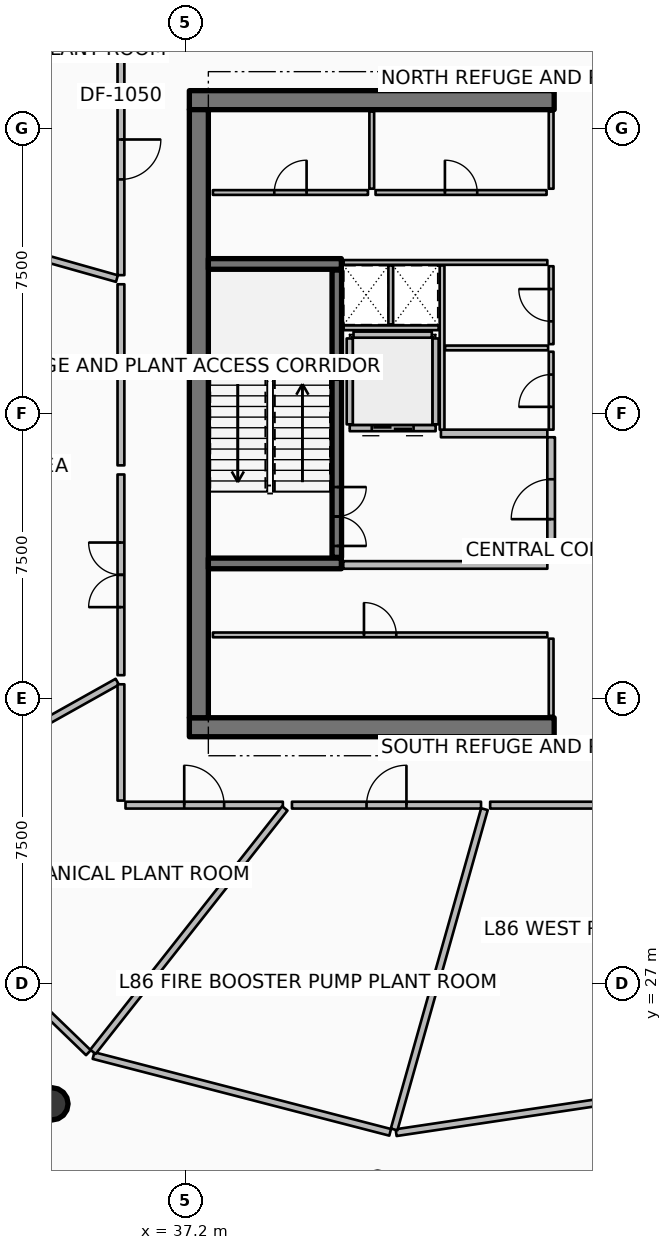
"""IFC4 building model, lengths in metres.
Left out: names, types, materials, properties, quantities, classifications, styles, units other than length and angle.
Written with IfcOpenShell. Run it as: python <this file> out.ifc"""

import sys

from ifc_helpers import new_model, si_unit, direction, frame, frame_2d, origin, origin_2d, place, context, subcontext, project, spatial, rectangle, hollow_rectangle, circle, extrude, element, fill, save


model = new_model("IFC4")
c1 = context("Model", 3, precision=1e-05, world=origin(), true_north=direction((0.0, 1.0)))
c2 = subcontext(c1, "Body", "Model", "MODEL_VIEW")
j1 = project(units=[si_unit("LENGTHUNIT", "METRE"), si_unit("PLANEANGLEUNIT", "RADIAN")], contexts=[c1])
p1 = place(None, origin())
s1 = spatial("IfcSite", under=j1, at=p1, CompositionType="ELEMENT")
p2 = place(p1, origin())
s2 = spatial("IfcBuilding", under=s1, at=p2, CompositionType="ELEMENT")
p3 = place(p2, frame((0.0, 0.0, 343.1)))
s3 = spatial("IfcBuildingStorey", under=s2, at=p3, CompositionType="ELEMENT", Elevation=343.1)
for number, where, z_axis, x_axis in (
    (1, (37.3, 33.75, 0.0), (0.0, 0.0, 1.0), (1.0, 0.0, 0.0)),
    (2, (37.3, 50.25, 0.0), (0.0, 0.0, 1.0), (1.0, 0.0, 0.0)),
):
    element("IfcWall", number, at=place(p3, frame(where, z_axis=z_axis, x_axis=x_axis)), inside=s3, PredefinedType="SHEAR", context=c2, shape_type="SweptSolid", body=[
        extrude(rectangle(XDim=9.6, YDim=0.5, at=frame_2d((4.8, 0.0))), origin(), (0.0, 0.0, 1.0), 4.2),
    ])
p4 = place(p3, frame((37.55, 34.0, 0.0), z_axis=(0.0, 0.0, 1.0), x_axis=(0.0, 1.0, 0.0)))
e3 = element("IfcWall", 3, at=p4, inside=s3, PredefinedType="SHEAR", context=c2, shape_type="SweptSolid", body=[
    extrude(rectangle(XDim=16.0, YDim=0.5, at=frame_2d((8.0, 0.0))), origin(), (0.0, 0.0, 1.0), 4.2),
])
for number, where, z_axis, x_axis in (
    (4, (37.8, 38.06, 0.0), (0.0, 0.0, 1.0), (1.0, 0.0, 0.0)),
    (5, (37.8, 45.94, 0.0), (0.0, 0.0, 1.0), (1.0, 0.0, 0.0)),
):
    element("IfcWall", number, at=place(p3, frame(where, z_axis=z_axis, x_axis=x_axis)), inside=s3, PredefinedType="SHEAR", context=c2, shape_type="SweptSolid", body=[
        extrude(rectangle(XDim=3.5, YDim=0.28, at=frame_2d((1.75, 0.0))), origin(), (0.0, 0.0, 1.0), 4.2),
    ])
p5 = place(p3, frame((41.18, 43.03, 0.0), z_axis=(0.0, 0.0, 1.0), x_axis=(1.0, 0.0, 0.0)))
e6 = element("IfcColumn", 6, at=p5, inside=s3, PredefinedType="COLUMN", context=c2, shape_type="SweptSolid", body=[
    extrude(hollow_rectangle(XDim=0.2, YDim=0.2, WallThickness=0.01, InnerFilletRadius=0.01, OuterFilletRadius=0.02, at=origin_2d()), origin(), (0.0, 0.0, 1.0), 1.895),
])
p6 = place(p3, frame((33.684, 23.841, 0.0), z_axis=(0.0, 0.0, 1.0), x_axis=(1.0, 0.0, 0.0)))
e7 = element("IfcColumn", 7, at=p6, inside=s3, PredefinedType="COLUMN", context=c2, shape_type="SweptSolid", body=[
    extrude(circle(Radius=0.425, at=origin_2d()), origin(), (0.0, 0.0, 1.0), 3.94),
])
p7 = place(p3, frame((41.18, 38.22, 0.0), z_axis=(0.0, 0.0, 1.0), x_axis=(0.0, 1.0, 0.0)))
e8 = element("IfcWall", 8, at=p7, inside=s3, PredefinedType="SOLIDWALL", context=c2, shape_type="SweptSolid", body=[
    extrude(rectangle(XDim=7.56, YDim=0.25, at=frame_2d((3.78, 0.0))), origin(), (0.0, 0.0, 1.0), 3.94),
])
p8 = place(p7, frame((0.3, 0.0, 0.0)))
e9 = element("IfcOpeningElement", 9, at=p8, cuts=e8, PredefinedType="OPENING", context=c2, shape_type="SweptSolid", body=[
    extrude(rectangle(XDim=1.55, YDim=2.15, at=frame_2d((0.775, 1.075))), frame((0.0, 0.135, 0.0), z_axis=(0.0, -1.0, 0.0), x_axis=(1.0, 0.0, 0.0)), (0.0, 0.0, 1.0), 0.27),
])
p9 = place(p3, frame((43.78, 41.62, 0.0), z_axis=(0.0, 0.0, 1.0), x_axis=(-1.0, 0.0, 0.0)))
e10 = element("IfcWall", 10, at=p9, inside=s3, PredefinedType="PARTITIONING", context=c2, shape_type="SweptSolid", body=[
    extrude(rectangle(XDim=2.26, YDim=0.16, at=frame_2d((1.13, 0.0))), origin(), (0.0, 0.0, 1.0), 3.94),
])
p10 = place(p9, frame((0.58, 0.0, 0.0)))
e11 = element("IfcOpeningElement", 11, at=p10, cuts=e10, PredefinedType="OPENING", context=c2, shape_type="SweptSolid", body=[
    extrude(rectangle(XDim=1.1, YDim=2.1, at=frame_2d((0.55, 1.05))), frame((0.0, 0.09, 0.0), z_axis=(0.0, -1.0, 0.0), x_axis=(1.0, 0.0, 0.0)), (0.0, 0.0, 1.0), 0.18),
])
for number, where, z_axis, x_axis in (
    (12, (43.78, 41.72, 0.0), (0.0, 0.0, 1.0), (0.0, 1.0, 0.0)),
    (13, (41.52, 41.72, 0.0), (0.0, 0.0, 1.0), (0.0, 1.0, 0.0)),
):
    element("IfcWall", number, at=place(p3, frame(where, z_axis=z_axis, x_axis=x_axis)), inside=s3, PredefinedType="PARTITIONING", context=c2, shape_type="SweptSolid", body=[
        extrude(rectangle(XDim=2.26, YDim=0.16, at=frame_2d((1.13, 0.0))), origin(), (0.0, 0.0, 1.0), 3.94),
    ])
p11 = place(p3, frame((41.62, 44.08, 0.0), z_axis=(0.0, 0.0, 1.0), x_axis=(1.0, 0.0, 0.0)))
e14 = element("IfcWall", 14, at=p11, inside=s3, PredefinedType="PARTITIONING", context=c2, shape_type="SweptSolid", body=[
    extrude(rectangle(XDim=2.06, YDim=0.16, at=frame_2d((1.03, 0.0))), origin(), (0.0, 0.0, 1.0), 3.94),
])
p12 = place(p3, frame((46.82, 34.05, 0.0), z_axis=(0.0, 0.0, 1.0), x_axis=(0.0, 1.0, 0.0)))
e15 = element("IfcWall", 15, at=p12, inside=s3, PredefinedType="PARTITIONING", context=c2, shape_type="SweptSolid", body=[
    extrude(rectangle(XDim=2.03, YDim=0.125, at=frame_2d((1.015, 0.0))), origin(), (0.0, 0.0, 1.0), 3.38),
])
p13 = place(p3, frame((37.92, 36.18, 0.0), z_axis=(0.0, 0.0, 1.0), x_axis=(1.0, 0.0, 0.0)))
e16 = element("IfcWall", 16, at=p13, inside=s3, PredefinedType="PARTITIONING", context=c2, shape_type="SweptSolid", body=[
    extrude(rectangle(XDim=8.8, YDim=0.125, at=frame_2d((4.4, 0.0))), origin(), (0.0, 0.0, 1.0), 3.38),
])
p14 = place(p13, frame((3.975, 0.0, 0.0)))
e17 = element("IfcOpeningElement", 17, at=p14, cuts=e16, PredefinedType="OPENING", context=c2, shape_type="SweptSolid", body=[
    extrude(rectangle(XDim=0.85, YDim=2.06, at=frame_2d((0.425, 1.03))), frame((0.0, 0.073, 0.0), z_axis=(0.0, -1.0, 0.0), x_axis=(1.0, 0.0, 0.0)), (0.0, 0.0, 1.0), 0.145),
])
for number, where, z_axis, x_axis in (
    (18, (46.82, 47.92, 0.0), (0.0, 0.0, 1.0), (0.0, 1.0, 0.0)),
    (19, (42.1, 47.92, 0.0), (0.0, 0.0, 1.0), (0.0, 1.0, 0.0)),
):
    element("IfcWall", number, at=place(p3, frame(where, z_axis=z_axis, x_axis=x_axis)), inside=s3, PredefinedType="PARTITIONING", context=c2, shape_type="SweptSolid", body=[
        extrude(rectangle(XDim=2.03, YDim=0.125, at=frame_2d((1.015, 0.0))), origin(), (0.0, 0.0, 1.0), 3.38),
    ])
p15 = place(p3, frame((37.92, 47.82, 0.0), z_axis=(0.0, 0.0, 1.0), x_axis=(1.0, 0.0, 0.0)))
e20 = element("IfcWall", 20, at=p15, inside=s3, PredefinedType="PARTITIONING", context=c2, shape_type="SweptSolid", body=[
    extrude(rectangle(XDim=4.08, YDim=0.125, at=frame_2d((2.04, 0.0))), origin(), (0.0, 0.0, 1.0), 3.38),
])
p16 = place(p15, frame((1.615, 0.0, 0.0)))
e21 = element("IfcOpeningElement", 21, at=p16, cuts=e20, PredefinedType="OPENING", context=c2, shape_type="SweptSolid", body=[
    extrude(rectangle(XDim=0.85, YDim=2.06, at=frame_2d((0.425, 1.03))), frame((0.0, 0.073, 0.0), z_axis=(0.0, -1.0, 0.0), x_axis=(1.0, 0.0, 0.0)), (0.0, 0.0, 1.0), 0.145),
])
p17 = place(p3, frame((42.2, 47.82, 0.0), z_axis=(0.0, 0.0, 1.0), x_axis=(1.0, 0.0, 0.0)))
e22 = element("IfcWall", 22, at=p17, inside=s3, PredefinedType="PARTITIONING", context=c2, shape_type="SweptSolid", body=[
    extrude(rectangle(XDim=4.5, YDim=0.125, at=frame_2d((2.25, 0.0))), origin(), (0.0, 0.0, 1.0), 3.38),
])
p18 = place(p17, frame((1.825, 0.0, 0.0)))
e23 = element("IfcOpeningElement", 23, at=p18, cuts=e22, PredefinedType="OPENING", context=c2, shape_type="SweptSolid", body=[
    extrude(rectangle(XDim=0.85, YDim=2.06, at=frame_2d((0.425, 1.03))), frame((0.0, 0.073, 0.0), z_axis=(0.0, -1.0, 0.0), x_axis=(1.0, 0.0, 0.0)), (0.0, 0.0, 1.0), 0.145),
])
p19 = place(p3, frame((41.35, 38.02, 0.0), z_axis=(0.0, 0.0, 1.0), x_axis=(1.0, 0.0, 0.0)))
e24 = element("IfcWall", 24, at=p19, inside=s3, PredefinedType="PARTITIONING", context=c2, shape_type="SweptSolid", body=[
    extrude(rectangle(XDim=5.37, YDim=0.2, at=frame_2d((2.685, 0.0))), origin(), (0.0, 0.0, 1.0), 3.94),
])
p20 = place(p3, frame((43.92, 41.48, 0.0), z_axis=(0.0, 0.0, 1.0), x_axis=(1.0, 0.0, 0.0)))
e25 = element("IfcWall", 25, at=p20, inside=s3, PredefinedType="PARTITIONING", context=c2, shape_type="SweptSolid", body=[
    extrude(rectangle(XDim=2.8, YDim=0.2, at=frame_2d((1.4, 0.0))), origin(), (0.0, 0.0, 1.0), 3.94),
])
p21 = place(p3, frame((46.82, 38.12, 0.0), z_axis=(0.0, 0.0, 1.0), x_axis=(0.0, 1.0, 0.0)))
e26 = element("IfcWall", 26, at=p21, inside=s3, PredefinedType="PARTITIONING", context=c2, shape_type="SweptSolid", body=[
    extrude(rectangle(XDim=3.26, YDim=0.2, at=frame_2d((1.63, 0.0))), origin(), (0.0, 0.0, 1.0), 3.94),
])
p22 = place(p21, frame((1.105, 0.0, 0.0)))
e27 = element("IfcOpeningElement", 27, at=p22, cuts=e26, PredefinedType="OPENING", context=c2, shape_type="SweptSolid", body=[
    extrude(rectangle(XDim=1.05, YDim=2.1, at=frame_2d((0.525, 1.05))), frame((0.0, 0.11, 0.0), z_axis=(0.0, -1.0, 0.0), x_axis=(1.0, 0.0, 0.0)), (0.0, 0.0, 1.0), 0.22),
])
p23 = place(p3, frame((41.36, 45.98, 0.0), z_axis=(0.0, 0.0, 1.0), x_axis=(1.0, 0.0, 0.0)))
e28 = element("IfcWall", 28, at=p23, inside=s3, PredefinedType="PARTITIONING", context=c2, shape_type="SweptSolid", body=[
    extrude(rectangle(XDim=5.36, YDim=0.125, at=frame_2d((2.68, 0.0))), origin(), (0.0, 0.0, 1.0), 3.38),
])
p24 = place(p3, frame((41.36, 44.26, 0.0), z_axis=(0.0, 0.0, 1.0), x_axis=(1.0, 0.0, 0.0)))
e29 = element("IfcWall", 29, at=p24, inside=s3, PredefinedType="PARTITIONING", context=c2, shape_type="SweptSolid", body=[
    extrude(rectangle(XDim=2.5, YDim=0.125, at=frame_2d((1.25, 0.0))), origin(), (0.0, 0.0, 1.0), 3.38),
])
p25 = place(p3, frame((42.6, 44.35, 0.0), z_axis=(0.0, 0.0, 1.0), x_axis=(0.0, 1.0, 0.0)))
e30 = element("IfcWall", 30, at=p25, inside=s3, PredefinedType="PARTITIONING", context=c2, shape_type="SweptSolid", body=[
    extrude(rectangle(XDim=1.55, YDim=0.125, at=frame_2d((0.775, 0.0))), origin(), (0.0, 0.0, 1.0), 3.38),
])
p26 = place(p3, frame((43.95, 41.58, 0.0), z_axis=(0.0, 0.0, 1.0), x_axis=(0.0, 1.0, 0.0)))
e31 = element("IfcWall", 31, at=p26, inside=s3, PredefinedType="PARTITIONING", context=c2, shape_type="SweptSolid", body=[
    extrude(rectangle(XDim=4.32, YDim=0.125, at=frame_2d((2.16, 0.0))), origin(), (0.0, 0.0, 1.0), 3.38),
])
p27 = place(p3, frame((44.03, 43.73, 0.0), z_axis=(0.0, 0.0, 1.0), x_axis=(1.0, 0.0, 0.0)))
e32 = element("IfcWall", 32, at=p27, inside=s3, PredefinedType="PARTITIONING", context=c2, shape_type="SweptSolid", body=[
    extrude(rectangle(XDim=2.71, YDim=0.125, at=frame_2d((1.355, 0.0))), origin(), (0.0, 0.0, 1.0), 3.38),
])
p28 = place(p3, frame((46.82, 41.58, 0.0), z_axis=(0.0, 0.0, 1.0), x_axis=(0.0, 1.0, 0.0)))
e33 = element("IfcWall", 33, at=p28, inside=s3, PredefinedType="PARTITIONING", context=c2, shape_type="SweptSolid", body=[
    extrude(rectangle(XDim=2.05, YDim=0.125, at=frame_2d((1.025, 0.0))), origin(), (0.0, 0.0, 1.0), 3.38),
])
p29 = place(p28, frame((0.6, 0.0, 0.0)))
e34 = element("IfcOpeningElement", 34, at=p29, cuts=e33, PredefinedType="OPENING", context=c2, shape_type="SweptSolid", body=[
    extrude(rectangle(XDim=0.85, YDim=2.06, at=frame_2d((0.425, 1.03))), frame((0.0, 0.073, 0.0), z_axis=(0.0, -1.0, 0.0), x_axis=(1.0, 0.0, 0.0)), (0.0, 0.0, 1.0), 0.145),
])
p30 = place(p3, frame((46.82, 43.83, 0.0), z_axis=(0.0, 0.0, 1.0), x_axis=(0.0, 1.0, 0.0)))
e35 = element("IfcWall", 35, at=p30, inside=s3, PredefinedType="PARTITIONING", context=c2, shape_type="SweptSolid", body=[
    extrude(rectangle(XDim=2.05, YDim=0.125, at=frame_2d((1.025, 0.0))), origin(), (0.0, 0.0, 1.0), 3.38),
])
p31 = place(p30, frame((0.6, 0.0, 0.0)))
e36 = element("IfcOpeningElement", 36, at=p31, cuts=e35, PredefinedType="OPENING", context=c2, shape_type="SweptSolid", body=[
    extrude(rectangle(XDim=0.85, YDim=2.06, at=frame_2d((0.425, 1.03))), frame((0.0, 0.073, 0.0), z_axis=(0.0, -1.0, 0.0), x_axis=(1.0, 0.0, 0.0)), (0.0, 0.0, 1.0), 0.145),
])
p32 = place(p3, frame((28.583, 31.038, 0.0), z_axis=(0.0, 0.0, 1.0), x_axis=(0.719358516059, -0.694638989241, 0.0)))
e37 = element("IfcWall", 37, at=p32, inside=s3, PredefinedType="PARTITIONING", context=c2, shape_type="SweptSolid", body=[
    extrude(rectangle(XDim=8.425, YDim=0.18, at=frame_2d((4.212, 0.0))), origin(), (0.0, 0.0, 1.0), 2.933),
])
p33 = place(p3, frame((34.779, 25.111, 0.0), z_axis=(0.0, 0.0, 1.0), x_axis=(0.96812020229, -0.250486075298, 0.0)))
e38 = element("IfcWall", 38, at=p33, inside=s3, PredefinedType="PARTITIONING", context=c2, shape_type="SweptSolid", body=[
    extrude(rectangle(XDim=8.062, YDim=0.18, at=frame_2d((4.031, 0.0))), origin(), (0.0, 0.0, 1.0), 2.933),
])
p34 = place(p3, frame((42.74, 23.083, 0.0), z_axis=(0.0, 0.0, 1.0), x_axis=(0.989035992024, 0.147674664315, 0.0)))
e39 = element("IfcWall", 39, at=p34, inside=s3, PredefinedType="PARTITIONING", context=c2, shape_type="SweptSolid", body=[
    extrude(rectangle(XDim=7.37, YDim=0.18, at=frame_2d((3.685, 0.0))), origin(), (0.0, 0.0, 1.0), 2.933),
])
p35 = place(p3, frame((35.5, 51.734, 0.0), z_axis=(0.0, 0.0, 1.0), x_axis=(0.0, -1.0, 0.0)))
e40 = element("IfcWall", 40, at=p35, inside=s3, PredefinedType="PARTITIONING", context=c2, shape_type="SweptSolid", body=[
    extrude(rectangle(XDim=6.089, YDim=0.18, at=frame_2d((3.044, 0.0))), origin(), (0.0, 0.0, 1.0), 2.933),
])
p36 = place(p35, frame((2.519, 0.0, 0.0)))
e41 = element("IfcOpeningElement", 41, at=p36, cuts=e40, PredefinedType="OPENING", context=c2, shape_type="SweptSolid", body=[
    extrude(rectangle(XDim=1.05, YDim=2.1, at=frame_2d((0.525, 1.05))), frame((0.0, 0.1, 0.0), z_axis=(0.0, -1.0, 0.0), x_axis=(1.0, 0.0, 0.0)), (0.0, 0.0, 1.0), 0.2),
])
p37 = place(p3, frame((35.394, 45.555, 0.0), z_axis=(0.0, 0.0, 1.0), x_axis=(-0.962460337435, 0.2714223625, 0.0)))
e42 = element("IfcWall", 42, at=p37, inside=s3, PredefinedType="PARTITIONING", context=c2, shape_type="SweptSolid", body=[
    extrude(rectangle(XDim=8.283, YDim=0.18, at=frame_2d((4.142, 0.0))), origin(), (0.0, 0.0, 1.0), 2.933),
])
p38 = place(p3, frame((35.5, 45.406, 0.0), z_axis=(0.0, 0.0, 1.0), x_axis=(0.0, -1.0, 0.0)))
e43 = element("IfcWall", 43, at=p38, inside=s3, PredefinedType="PARTITIONING", context=c2, shape_type="SweptSolid", body=[
    extrude(rectangle(XDim=4.765, YDim=0.18, at=frame_2d((2.383, 0.0))), origin(), (0.0, 0.0, 1.0), 2.933),
])
p39 = place(p3, frame((35.5, 40.4, 0.0), z_axis=(0.0, 0.0, 1.0), x_axis=(0.0, -1.0, 0.0)))
e44 = element("IfcWall", 44, at=p39, inside=s3, PredefinedType="PARTITIONING", context=c2, shape_type="SweptSolid", body=[
    extrude(rectangle(XDim=5.281, YDim=0.18, at=frame_2d((2.64, 0.0))), origin(), (0.0, 0.0, 1.0), 2.933),
])
p40 = place(p39, frame((1.79, 0.0, 0.0)))
e45 = element("IfcOpeningElement", 45, at=p40, cuts=e44, PredefinedType="OPENING", context=c2, shape_type="SweptSolid", body=[
    extrude(rectangle(XDim=1.7, YDim=2.15, at=frame_2d((0.85, 1.075))), frame((0.0, 0.1, 0.0), z_axis=(0.0, -1.0, 0.0), x_axis=(1.0, 0.0, 0.0)), (0.0, 0.0, 1.0), 0.2),
])
p41 = place(p3, frame((35.404, 34.946, 0.0), z_axis=(0.0, 0.0, 1.0), x_axis=(-0.872492108865, -0.488628202182, 0.0)))
e46 = element("IfcWall", 46, at=p41, inside=s3, PredefinedType="PARTITIONING", context=c2, shape_type="SweptSolid", body=[
    extrude(rectangle(XDim=7.783, YDim=0.18, at=frame_2d((3.892, 0.0))), origin(), (0.0, 0.0, 1.0), 2.933),
])
p42 = place(p3, frame((35.5, 34.88, 0.0), z_axis=(0.0, 0.0, 1.0), x_axis=(0.0, -1.0, 0.0)))
e47 = element("IfcWall", 47, at=p42, inside=s3, PredefinedType="PARTITIONING", context=c2, shape_type="SweptSolid", body=[
    extrude(rectangle(XDim=3.06, YDim=0.18, at=frame_2d((1.53, 0.0))), origin(), (0.0, 0.0, 1.0), 2.933),
])
p43 = place(p3, frame((35.62, 31.7, 0.0), z_axis=(0.0, 0.0, 1.0), x_axis=(1.0, 0.0, 0.0)))
e48 = element("IfcWall", 48, at=p43, inside=s3, PredefinedType="PARTITIONING", context=c2, shape_type="SweptSolid", body=[
    extrude(rectangle(XDim=4.14, YDim=0.18, at=frame_2d((2.07, 0.0))), origin(), (0.0, 0.0, 1.0), 2.933),
])
p44 = place(p43, frame((1.545, 0.0, 0.0)))
e49 = element("IfcOpeningElement", 49, at=p44, cuts=e48, PredefinedType="OPENING", context=c2, shape_type="SweptSolid", body=[
    extrude(rectangle(XDim=1.05, YDim=2.1, at=frame_2d((0.525, 1.05))), frame((0.0, 0.1, 0.0), z_axis=(0.0, -1.0, 0.0), x_axis=(1.0, 0.0, 0.0)), (0.0, 0.0, 1.0), 0.2),
])
p45 = place(p3, frame((39.812, 31.614, 0.0), z_axis=(0.0, 0.0, 1.0), x_axis=(-0.619086016157, -0.785323184809, 0.0)))
e50 = element("IfcWall", 50, at=p45, inside=s3, PredefinedType="PARTITIONING", context=c2, shape_type="SweptSolid", body=[
    extrude(rectangle(XDim=8.155, YDim=0.18, at=frame_2d((4.078, 0.0))), origin(), (0.0, 0.0, 1.0), 2.933),
])
p46 = place(p3, frame((40.0, 31.7, 0.0), z_axis=(0.0, 0.0, 1.0), x_axis=(1.0, 0.0, 0.0)))
e51 = element("IfcWall", 51, at=p46, inside=s3, PredefinedType="PARTITIONING", context=c2, shape_type="SweptSolid", body=[
    extrude(rectangle(XDim=4.975, YDim=0.18, at=frame_2d((2.488, 0.0))), origin(), (0.0, 0.0, 1.0), 2.933),
])
p47 = place(p46, frame((1.962, 0.0, 0.0)))
e52 = element("IfcOpeningElement", 52, at=p47, cuts=e51, PredefinedType="OPENING", context=c2, shape_type="SweptSolid", body=[
    extrude(rectangle(XDim=1.05, YDim=2.1, at=frame_2d((0.525, 1.05))), frame((0.0, 0.1, 0.0), z_axis=(0.0, -1.0, 0.0), x_axis=(1.0, 0.0, 0.0)), (0.0, 0.0, 1.0), 0.2),
])
p48 = place(p3, frame((45.065, 31.594, 0.0), z_axis=(0.0, 0.0, 1.0), x_axis=(-0.271427049977, -0.962459015512, 0.0)))
e53 = element("IfcWall", 53, at=p48, inside=s3, PredefinedType="PARTITIONING", context=c2, shape_type="SweptSolid", body=[
    extrude(rectangle(XDim=8.755, YDim=0.18, at=frame_2d((4.378, 0.0))), origin(), (0.0, 0.0, 1.0), 2.933),
])
p49 = place(p3, frame((45.215, 31.7, 0.0), z_axis=(0.0, 0.0, 1.0), x_axis=(1.0, 0.0, 0.0)))
e54 = element("IfcWall", 54, at=p49, inside=s3, PredefinedType="PARTITIONING", context=c2, shape_type="SweptSolid", body=[
    extrude(rectangle(XDim=3.884, YDim=0.18, at=frame_2d((1.942, 0.0))), origin(), (0.0, 0.0, 1.0), 2.933),
])
p50 = place(p8, origin())
e55 = element("IfcDoor", 55, at=p50, inside=s3, OperationType="DOUBLE_DOOR_SINGLE_SWING", PredefinedType="DOOR", context=c2, shape_type="SweptSolid", body=[
    extrude(rectangle(XDim=1.55, YDim=2.15, at=frame_2d((0.775, 1.075))), frame((0.0, 0.025, 0.0), z_axis=(0.0, -1.0, 0.0), x_axis=(1.0, 0.0, 0.0)), (0.0, 0.0, 1.0), 0.05),
])
fill(e9, e55)
p51 = place(p10, origin())
e56 = element("IfcDoor", 56, at=p51, inside=s3, OperationType="DOUBLE_DOOR_SLIDING", PredefinedType="DOOR", context=c2, shape_type="SweptSolid", body=[
    extrude(rectangle(XDim=1.1, YDim=2.1, at=frame_2d((0.55, 1.05))), frame((0.0, 0.025, 0.0), z_axis=(0.0, -1.0, 0.0), x_axis=(1.0, 0.0, 0.0)), (0.0, 0.0, 1.0), 0.05),
])
fill(e11, e56)
p52 = place(p14, origin())
e57 = element("IfcDoor", 57, at=p52, inside=s3, OperationType="SINGLE_SWING_LEFT", PredefinedType="DOOR", context=c2, shape_type="SweptSolid", body=[
    extrude(rectangle(XDim=0.85, YDim=2.06, at=frame_2d((0.425, 1.03))), frame((0.0, 0.025, 0.0), z_axis=(0.0, -1.0, 0.0), x_axis=(1.0, 0.0, 0.0)), (0.0, 0.0, 1.0), 0.05),
])
fill(e17, e57)
p53 = place(p16, origin())
e58 = element("IfcDoor", 58, at=p53, inside=s3, OperationType="SINGLE_SWING_RIGHT", PredefinedType="DOOR", context=c2, shape_type="SweptSolid", body=[
    extrude(rectangle(XDim=0.85, YDim=2.06, at=frame_2d((0.425, 1.03))), frame((0.0, 0.025, 0.0), z_axis=(0.0, -1.0, 0.0), x_axis=(1.0, 0.0, 0.0)), (0.0, 0.0, 1.0), 0.05),
])
fill(e21, e58)
p54 = place(p18, origin())
e59 = element("IfcDoor", 59, at=p54, inside=s3, OperationType="SINGLE_SWING_LEFT", PredefinedType="DOOR", context=c2, shape_type="SweptSolid", body=[
    extrude(rectangle(XDim=0.85, YDim=2.06, at=frame_2d((0.425, 1.03))), frame((0.0, 0.025, 0.0), z_axis=(0.0, -1.0, 0.0), x_axis=(1.0, 0.0, 0.0)), (0.0, 0.0, 1.0), 0.05),
])
fill(e23, e59)
p55 = place(p22, origin())
e60 = element("IfcDoor", 60, at=p55, inside=s3, OperationType="SINGLE_SWING_LEFT", PredefinedType="DOOR", context=c2, shape_type="SweptSolid", body=[
    extrude(rectangle(XDim=1.05, YDim=2.1, at=frame_2d((0.525, 1.05))), frame((0.0, 0.025, 0.0), z_axis=(0.0, -1.0, 0.0), x_axis=(1.0, 0.0, 0.0)), (0.0, 0.0, 1.0), 0.05),
])
fill(e27, e60)
p56 = place(p29, origin())
e61 = element("IfcDoor", 61, at=p56, inside=s3, OperationType="SINGLE_SWING_LEFT", PredefinedType="DOOR", context=c2, shape_type="SweptSolid", body=[
    extrude(rectangle(XDim=0.85, YDim=2.06, at=frame_2d((0.425, 1.03))), frame((0.0, 0.025, 0.0), z_axis=(0.0, -1.0, 0.0), x_axis=(1.0, 0.0, 0.0)), (0.0, 0.0, 1.0), 0.05),
])
fill(e34, e61)
p57 = place(p31, origin())
e62 = element("IfcDoor", 62, at=p57, inside=s3, OperationType="SINGLE_SWING_RIGHT", PredefinedType="DOOR", context=c2, shape_type="SweptSolid", body=[
    extrude(rectangle(XDim=0.85, YDim=2.06, at=frame_2d((0.425, 1.03))), frame((0.0, 0.025, 0.0), z_axis=(0.0, -1.0, 0.0), x_axis=(1.0, 0.0, 0.0)), (0.0, 0.0, 1.0), 0.05),
])
fill(e36, e62)
p58 = place(p36, origin())
e63 = element("IfcDoor", 63, at=p58, inside=s3, OperationType="SINGLE_SWING_LEFT", PredefinedType="DOOR", context=c2, shape_type="SweptSolid", body=[
    extrude(rectangle(XDim=1.05, YDim=2.1, at=frame_2d((0.525, 1.05))), frame((0.0, 0.025, 0.0), z_axis=(0.0, -1.0, 0.0), x_axis=(1.0, 0.0, 0.0)), (0.0, 0.0, 1.0), 0.05),
])
fill(e41, e63)
p59 = place(p40, origin())
e64 = element("IfcDoor", 64, at=p59, inside=s3, OperationType="DOUBLE_DOOR_SINGLE_SWING", PredefinedType="DOOR", context=c2, shape_type="SweptSolid", body=[
    extrude(rectangle(XDim=1.7, YDim=2.15, at=frame_2d((0.85, 1.075))), frame((0.0, 0.025, 0.0), z_axis=(0.0, -1.0, 0.0), x_axis=(1.0, 0.0, 0.0)), (0.0, 0.0, 1.0), 0.05),
])
fill(e45, e64)
p60 = place(p44, origin())
e65 = element("IfcDoor", 65, at=p60, inside=s3, OperationType="SINGLE_SWING_LEFT", PredefinedType="DOOR", context=c2, shape_type="SweptSolid", body=[
    extrude(rectangle(XDim=1.05, YDim=2.1, at=frame_2d((0.525, 1.05))), frame((0.0, 0.025, 0.0), z_axis=(0.0, -1.0, 0.0), x_axis=(1.0, 0.0, 0.0)), (0.0, 0.0, 1.0), 0.05),
])
fill(e49, e65)
p61 = place(p47, origin())
e66 = element("IfcDoor", 66, at=p61, inside=s3, OperationType="SINGLE_SWING_RIGHT", PredefinedType="DOOR", context=c2, shape_type="SweptSolid", body=[
    extrude(rectangle(XDim=1.05, YDim=2.1, at=frame_2d((0.525, 1.05))), frame((0.0, 0.025, 0.0), z_axis=(0.0, -1.0, 0.0), x_axis=(1.0, 0.0, 0.0)), (0.0, 0.0, 1.0), 0.05),
])
fill(e52, e66)
save(model, sys.argv[1])
